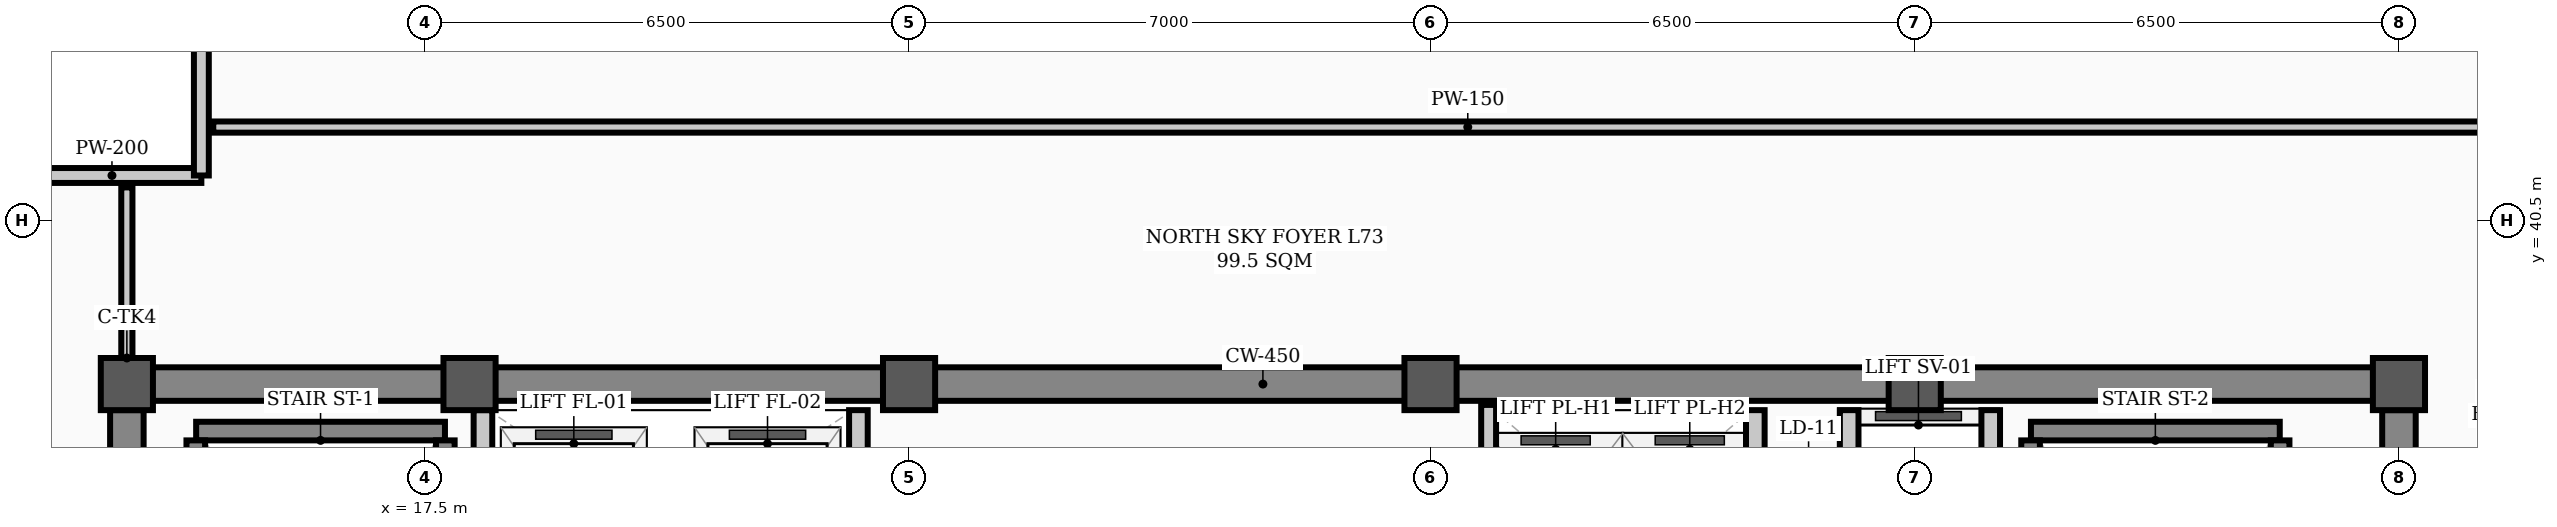
"""IFC4 building model, lengths in metres.
Left out: names, types, materials, properties, quantities, classifications, styles, units other than length and angle.
Written with IfcOpenShell. Run it as: python <this file> out.ifc"""

import sys

from ifc_helpers import new_model, si_unit, direction, frame, frame_2d, origin, origin_2d, place, context, subcontext, project, spatial, rectangle, hollow_rectangle, extrude, element, save


model = new_model("IFC4")
c1 = context("Model", 3, precision=1e-05, world=origin(), true_north=direction((0.0, 1.0)))
c2 = subcontext(c1, "Body", "Model", "MODEL_VIEW")
j1 = project(units=[si_unit("LENGTHUNIT", "METRE"), si_unit("PLANEANGLEUNIT", "RADIAN")], contexts=[c1])
p1 = place(None, origin())
s1 = spatial("IfcSite", under=j1, at=p1, CompositionType="ELEMENT")
p2 = place(p1, origin())
s2 = spatial("IfcBuilding", under=s1, at=p2, CompositionType="ELEMENT")
p3 = place(p2, frame((0.0, 0.0, 293.0)))
s3 = spatial("IfcBuildingStorey", under=s2, at=p3, CompositionType="ELEMENT", Elevation=293.0)
for number, where, z_axis, x_axis in (
    (1, (13.5, 38.3, 0.0), (0.0, 0.0, 1.0), (1.0, 0.0, 0.0)),
    (2, (18.1, 38.3, 0.0), (0.0, 0.0, 1.0), (1.0, 0.0, 0.0)),
    (3, (24.0, 38.3, 0.0), (0.0, 0.0, 1.0), (1.0, 0.0, 0.0)),
    (4, (31.0, 38.3, 0.0), (0.0, 0.0, 1.0), (1.0, 0.0, 0.0)),
    (5, (37.5, 38.3, 0.0), (0.0, 0.0, 1.0), (1.0, 0.0, 0.0)),
    (6, (44.0, 38.3, 0.0), (0.0, 0.0, 1.0), (1.0, 0.0, 0.0)),
):
    element("IfcColumn", number, at=place(p3, frame(where, z_axis=z_axis, x_axis=x_axis)), inside=s3, PredefinedType="COLUMN", context=c2, shape_type="SweptSolid", body=[
        extrude(hollow_rectangle(XDim=0.7, YDim=0.7, WallThickness=0.028, InnerFilletRadius=0.014, OuterFilletRadius=0.042, at=origin_2d()), origin(), (0.0, 0.0, 1.0), 3.9),
    ])
for number, where, z_axis, x_axis in (
    (7, (12.1, 41.1, 0.0), (0.0, 0.0, 1.0), (1.0, 0.0, 0.0)),
    (8, (14.5, 41.1, 0.0), (0.0, 0.0, 1.0), (0.0, 1.0, 0.0)),
):
    element("IfcWall", number, at=place(p3, frame(where, z_axis=z_axis, x_axis=x_axis)), inside=s3, PredefinedType="PARAPET", context=c2, shape_type="SweptSolid", body=[
        extrude(rectangle(XDim=2.4, YDim=0.2, at=frame_2d((1.2, 0.0))), origin(), (0.0, 0.0, 1.0), 1.2),
    ])
p4 = place(p3, frame((13.5, 38.3, 0.0), z_axis=(0.0, 0.0, 1.0), x_axis=(1.0, 0.0, 0.0)))
e9 = element("IfcWall", 9, at=p4, inside=s3, PredefinedType="SHEAR", context=c2, shape_type="SweptSolid", body=[
    extrude(rectangle(XDim=30.5, YDim=0.45, at=frame_2d((15.25, 0.0))), origin(), (0.0, 0.0, 1.0), 3.72),
])
for number, where, z_axis, x_axis in (
    (10, (13.5, 29.35, 0.0), (0.0, 0.0, 1.0), (0.0, 1.0, 0.0)),
    (11, (44.0, 29.35, 0.0), (0.0, 0.0, 1.0), (0.0, 1.0, 0.0)),
):
    element("IfcWall", number, at=place(p3, frame(where, z_axis=z_axis, x_axis=x_axis)), inside=s3, PredefinedType="SHEAR", context=c2, shape_type="SweptSolid", body=[
        extrude(rectangle(XDim=8.6, YDim=0.45, at=frame_2d((4.3, 0.0))), origin(), (0.0, 0.0, 1.0), 3.72),
    ])
p5 = place(p3, frame((14.43, 37.669, 0.0), z_axis=(0.0, 0.0, 1.0), x_axis=(1.0, 0.0, 0.0)))
e12 = element("IfcWall", 12, at=p5, inside=s3, PredefinedType="STANDARD", context=c2, shape_type="SweptSolid", body=[
    extrude(rectangle(XDim=3.34, YDim=0.25, at=frame_2d((1.67, 0.0))), origin(), (0.0, 0.0, 1.0), 3.72),
])
for number, where, z_axis, x_axis in (
    (13, (14.425, 30.36, 0.0), (0.0, 0.0, 1.0), (0.0, 1.0, 0.0)),
    (14, (17.775, 30.36, 0.0), (0.0, 0.0, 1.0), (0.0, 1.0, 0.0)),
):
    element("IfcWall", number, at=place(p3, frame(where, z_axis=z_axis, x_axis=x_axis)), inside=s3, PredefinedType="STANDARD", context=c2, shape_type="SweptSolid", body=[
        extrude(rectangle(XDim=7.184, YDim=0.25, at=frame_2d((3.592, 0.0))), origin(), (0.0, 0.0, 1.0), 3.72),
    ])
p6 = place(p3, frame((39.06, 37.669, 0.0), z_axis=(0.0, 0.0, 1.0), x_axis=(1.0, 0.0, 0.0)))
e15 = element("IfcWall", 15, at=p6, inside=s3, PredefinedType="STANDARD", context=c2, shape_type="SweptSolid", body=[
    extrude(rectangle(XDim=3.34, YDim=0.25, at=frame_2d((1.67, 0.0))), origin(), (0.0, 0.0, 1.0), 3.72),
])
for number, where, z_axis, x_axis in (
    (16, (39.055, 30.36, 0.0), (0.0, 0.0, 1.0), (0.0, 1.0, 0.0)),
    (17, (42.405, 30.36, 0.0), (0.0, 0.0, 1.0), (0.0, 1.0, 0.0)),
):
    element("IfcWall", number, at=place(p3, frame(where, z_axis=z_axis, x_axis=x_axis)), inside=s3, PredefinedType="STANDARD", context=c2, shape_type="SweptSolid", body=[
        extrude(rectangle(XDim=7.184, YDim=0.25, at=frame_2d((3.592, 0.0))), origin(), (0.0, 0.0, 1.0), 3.72),
    ])
p7 = place(p3, frame((36.62, 31.95, 0.0), z_axis=(0.0, 0.0, 1.0), x_axis=(0.0, 1.0, 0.0)))
e18 = element("IfcWall", 18, at=p7, inside=s3, PredefinedType="STANDARD", context=c2, shape_type="SweptSolid", body=[
    extrude(rectangle(XDim=6.0, YDim=0.25, at=frame_2d((3.0, 0.0))), origin(), (0.0, 0.0, 1.0), 3.4),
])
p8 = place(p7, frame((0.9, 0.0, 0.0)))
e19 = element("IfcOpeningElement", 19, at=p8, cuts=e18, PredefinedType="OPENING", context=c2, shape_type="SweptSolid", body=[
    extrude(rectangle(XDim=1.1, YDim=2.08, at=frame_2d((0.55, 1.04))), frame((0.0, 0.135, 0.0), z_axis=(0.0, -1.0, 0.0), x_axis=(1.0, 0.0, 0.0)), (0.0, 0.0, 1.0), 0.27),
])
p9 = place(p7, frame((4.0, 0.0, 0.0)))
e20 = element("IfcOpeningElement", 20, at=p9, cuts=e18, PredefinedType="OPENING", context=c2, shape_type="SweptSolid", body=[
    extrude(rectangle(XDim=1.1, YDim=2.08, at=frame_2d((0.55, 1.04))), frame((0.0, 0.135, 0.0), z_axis=(0.0, -1.0, 0.0), x_axis=(1.0, 0.0, 0.0)), (0.0, 0.0, 1.0), 0.27),
])
p10 = place(p3, frame((38.52, 31.95, 0.0), z_axis=(0.0, 0.0, 1.0), x_axis=(0.0, 1.0, 0.0)))
e21 = element("IfcWall", 21, at=p10, inside=s3, PredefinedType="STANDARD", context=c2, shape_type="SweptSolid", body=[
    extrude(rectangle(XDim=6.0, YDim=0.25, at=frame_2d((3.0, 0.0))), origin(), (0.0, 0.0, 1.0), 3.4),
])
for number, where, z_axis, x_axis in (
    (22, (18.28, 34.62, 0.0), (0.0, 0.0, 1.0), (0.0, 1.0, 0.0)),
    (23, (23.32, 34.62, 0.0), (0.0, 0.0, 1.0), (0.0, 1.0, 0.0)),
):
    element("IfcWall", number, at=place(p3, frame(where, z_axis=z_axis, x_axis=x_axis)), inside=s3, PredefinedType="STANDARD", context=c2, shape_type="SweptSolid", body=[
        extrude(rectangle(XDim=3.33, YDim=0.25, at=frame_2d((1.665, 0.0))), origin(), (0.0, 0.0, 1.0), 3.72),
    ])
p11 = place(p3, frame((35.36, 34.9, 0.0), z_axis=(0.0, 0.0, 1.0), x_axis=(0.0, 1.0, 0.0)))
e24 = element("IfcWall", 24, at=p11, inside=s3, PredefinedType="STANDARD", context=c2, shape_type="SweptSolid", body=[
    extrude(rectangle(XDim=3.05, YDim=0.25, at=frame_2d((1.525, 0.0))), origin(), (0.0, 0.0, 1.0), 3.4),
])
p12 = place(p3, frame((14.66, 41.75, 0.0), z_axis=(0.0, 0.0, 1.0), x_axis=(1.0, 0.0, 0.0)))
e25 = element("IfcWall", 25, at=p12, inside=s3, PredefinedType="PARTITIONING", context=c2, shape_type="SweptSolid", body=[
    extrude(rectangle(XDim=33.68, YDim=0.15, at=frame_2d((16.84, 0.0))), origin(), (0.0, 0.0, 1.0), 3.2),
])
p13 = place(p3, frame((13.5, 38.535, 0.0), z_axis=(0.0, 0.0, 1.0), x_axis=(0.0, 1.0, 0.0)))
e26 = element("IfcWall", 26, at=p13, inside=s3, PredefinedType="PARTITIONING", context=c2, shape_type="SweptSolid", body=[
    extrude(rectangle(XDim=2.405, YDim=0.15, at=frame_2d((1.203, 0.0))), origin(), (0.0, 0.0, 1.0), 3.72),
])
p14 = place(p3, frame((31.78, 34.9, 0.0), z_axis=(0.0, 0.0, 1.0), x_axis=(0.0, 1.0, 0.0)))
e27 = element("IfcWall", 27, at=p14, inside=s3, PredefinedType="STANDARD", context=c2, shape_type="SweptSolid", body=[
    extrude(rectangle(XDim=3.12, YDim=0.2, at=frame_2d((1.56, 0.0))), origin(), (0.0, 0.0, 1.0), 3.4),
])
save(model, sys.argv[1])
